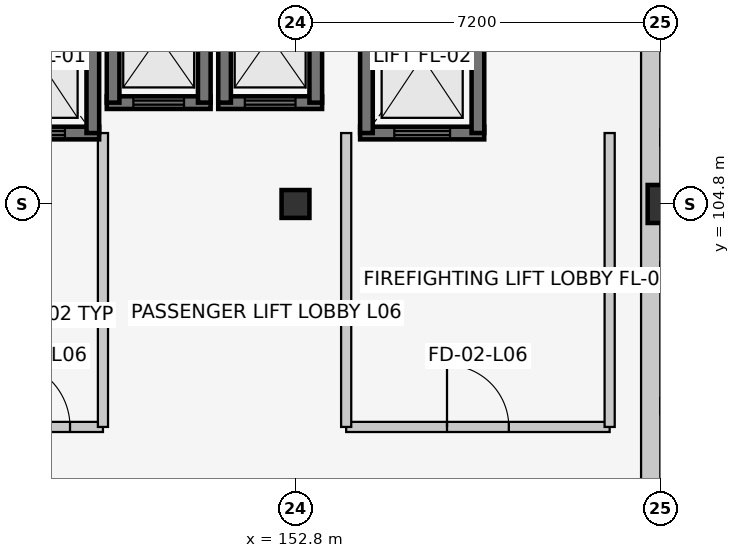
"""IFC4 building model, lengths in metres.
Left out: names, types, materials, properties, quantities, classifications, styles, units other than length and angle.
Written with IfcOpenShell. Run it as: python <this file> out.ifc"""

import sys

from ifc_helpers import new_model, si_unit, direction, frame, frame_2d, origin, origin_2d, place, context, subcontext, project, spatial, rectangle, extrude, element, fill, save


model = new_model("IFC4")
c1 = context("Model", 3, precision=1e-05, world=origin(), true_north=direction((0.0, 1.0)))
c2 = subcontext(c1, "Body", "Model", "MODEL_VIEW")
j1 = project(units=[si_unit("LENGTHUNIT", "METRE"), si_unit("PLANEANGLEUNIT", "RADIAN")], contexts=[c1])
p1 = place(None, origin())
s1 = spatial("IfcSite", under=j1, at=p1, CompositionType="ELEMENT")
p2 = place(p1, origin())
s2 = spatial("IfcBuilding", under=s1, at=p2, CompositionType="ELEMENT")
p3 = place(p2, frame((0.0, 0.0, 25.8)))
s3 = spatial("IfcBuildingStorey", under=s2, at=p3, CompositionType="ELEMENT", Elevation=25.8)
p4 = place(p3, frame((152.8, 104.8, 0.0), z_axis=(0.0, 0.0, 1.0), x_axis=(1.0, 0.0, 0.0)))
e1 = element("IfcColumn", 1, at=p4, inside=s3, PredefinedType="COLUMN", context=c2, shape_type="SweptSolid", body=[
    extrude(rectangle(XDim=0.55, YDim=0.55, at=origin_2d()), origin(), (0.0, 0.0, 1.0), 3.9),
])
p5 = place(p3, frame((160.0, 104.8, 0.0), z_axis=(0.0, 0.0, 1.0), x_axis=(1.0, 0.0, 0.0)))
e2 = element("IfcColumn", 2, at=p5, inside=s3, PredefinedType="COLUMN", context=c2, shape_type="SweptSolid", body=[
    extrude(rectangle(XDim=0.5, YDim=0.75, at=origin_2d()), origin(), (0.0, 0.0, 1.0), 3.9),
])
p6 = place(p3, frame((159.81, 112.0, 0.0), z_axis=(0.0, 0.0, 1.0), x_axis=(0.0, -1.0, 0.0)))
e3 = element("IfcWall", 3, at=p6, inside=s3, PredefinedType="SOLIDWALL", context=c2, shape_type="SweptSolid", body=[
    extrude(rectangle(XDim=28.8, YDim=0.38, at=frame_2d((14.4, 0.0))), origin(), (0.0, 0.0, 1.0), 3.045),
])
p7 = place(p3, frame((146.475, 106.2, 0.0), z_axis=(0.0, 0.0, 1.0), x_axis=(1.0, 0.0, 0.0)))
e4 = element("IfcWall", 4, at=p7, inside=s3, PredefinedType="SHEAR", context=c2, shape_type="SweptSolid", body=[
    extrude(rectangle(XDim=2.45, YDim=0.25, at=frame_2d((1.225, 0.0))), origin(), (0.0, 0.0, 1.0), 3.65),
])
p8 = place(p7, frame((0.675, 0.0, 0.0)))
e5 = element("IfcOpeningElement", 5, at=p8, cuts=e4, PredefinedType="OPENING", context=c2, shape_type="SweptSolid", body=[
    extrude(rectangle(XDim=1.1, YDim=2.15, at=frame_2d((0.55, 1.075))), frame((0.0, 0.137, 0.0), z_axis=(0.0, -1.0, 0.0), x_axis=(1.0, 0.0, 0.0)), (0.0, 0.0, 1.0), 0.274),
])
p9 = place(p3, frame((148.8, 106.2, 0.0), z_axis=(0.0, 0.0, 1.0), x_axis=(0.0, 1.0, 0.0)))
e6 = element("IfcWall", 6, at=p9, inside=s3, PredefinedType="SHEAR", context=c2, shape_type="SweptSolid", body=[
    extrude(rectangle(XDim=3.0, YDim=0.25, at=frame_2d((1.5, 0.0))), origin(), (0.0, 0.0, 1.0), 3.65),
])
p10 = place(p3, frame((146.4, 100.4, 0.0), z_axis=(0.0, 0.0, 1.0), x_axis=(1.0, 0.0, 0.0)))
e7 = element("IfcWall", 7, at=p10, inside=s3, PredefinedType="PARTITIONING", context=c2, shape_type="SweptSolid", body=[
    extrude(rectangle(XDim=2.6, YDim=0.2, at=frame_2d((1.3, 0.0))), origin(), (0.0, 0.0, 1.0), 3.65),
])
p11 = place(p10, frame((0.65, 0.0, 0.0)))
e8 = element("IfcOpeningElement", 8, at=p11, cuts=e7, PredefinedType="OPENING", context=c2, shape_type="SweptSolid", body=[
    extrude(rectangle(XDim=1.3, YDim=2.2, at=frame_2d((0.65, 1.1))), frame((0.0, 0.112, 0.0), z_axis=(0.0, -1.0, 0.0), x_axis=(1.0, 0.0, 0.0)), (0.0, 0.0, 1.0), 0.224),
])
p12 = place(p3, frame((149.0, 100.4, 0.0), z_axis=(0.0, 0.0, 1.0), x_axis=(0.0, 1.0, 0.0)))
e9 = element("IfcWall", 9, at=p12, inside=s3, PredefinedType="PARTITIONING", context=c2, shape_type="SweptSolid", body=[
    extrude(rectangle(XDim=5.8, YDim=0.2, at=frame_2d((2.9, 0.0))), origin(), (0.0, 0.0, 1.0), 3.395),
])
p13 = place(p3, frame((154.075, 106.2, 0.0), z_axis=(0.0, 0.0, 1.0), x_axis=(1.0, 0.0, 0.0)))
e10 = element("IfcWall", 10, at=p13, inside=s3, PredefinedType="SHEAR", context=c2, shape_type="SweptSolid", body=[
    extrude(rectangle(XDim=2.45, YDim=0.25, at=frame_2d((1.225, 0.0))), origin(), (0.0, 0.0, 1.0), 3.65),
])
p14 = place(p13, frame((0.675, 0.0, 0.0)))
e11 = element("IfcOpeningElement", 11, at=p14, cuts=e10, PredefinedType="OPENING", context=c2, shape_type="SweptSolid", body=[
    extrude(rectangle(XDim=1.1, YDim=2.15, at=frame_2d((0.55, 1.075))), frame((0.0, 0.137, 0.0), z_axis=(0.0, -1.0, 0.0), x_axis=(1.0, 0.0, 0.0)), (0.0, 0.0, 1.0), 0.274),
])
for number, where, z_axis, x_axis in (
    (12, (154.2, 109.2, 0.0), (0.0, 0.0, 1.0), (0.0, -1.0, 0.0)),
    (13, (156.4, 106.2, 0.0), (0.0, 0.0, 1.0), (0.0, 1.0, 0.0)),
):
    element("IfcWall", number, at=place(p3, frame(where, z_axis=z_axis, x_axis=x_axis)), inside=s3, PredefinedType="SHEAR", context=c2, shape_type="SweptSolid", body=[
        extrude(rectangle(XDim=3.0, YDim=0.25, at=frame_2d((1.5, 0.0))), origin(), (0.0, 0.0, 1.0), 3.65),
    ])
p15 = place(p3, frame((153.8, 100.4, 0.0), z_axis=(0.0, 0.0, 1.0), x_axis=(1.0, 0.0, 0.0)))
e14 = element("IfcWall", 14, at=p15, inside=s3, PredefinedType="PARTITIONING", context=c2, shape_type="SweptSolid", body=[
    extrude(rectangle(XDim=5.2, YDim=0.2, at=frame_2d((2.6, 0.0))), origin(), (0.0, 0.0, 1.0), 3.65),
])
p16 = place(p15, frame((1.99, 0.0, 0.0)))
e15 = element("IfcOpeningElement", 15, at=p16, cuts=e14, PredefinedType="OPENING", context=c2, shape_type="SweptSolid", body=[
    extrude(rectangle(XDim=1.22, YDim=2.2, at=frame_2d((0.61, 1.1))), frame((0.0, 0.112, 0.0), z_axis=(0.0, -1.0, 0.0), x_axis=(1.0, 0.0, 0.0)), (0.0, 0.0, 1.0), 0.224),
])
for number, where, z_axis, x_axis in (
    (16, (153.8, 106.2, 0.0), (0.0, 0.0, 1.0), (0.0, -1.0, 0.0)),
    (17, (159.0, 100.4, 0.0), (0.0, 0.0, 1.0), (0.0, 1.0, 0.0)),
):
    element("IfcWall", number, at=place(p3, frame(where, z_axis=z_axis, x_axis=x_axis)), inside=s3, PredefinedType="PARTITIONING", context=c2, shape_type="SweptSolid", body=[
        extrude(rectangle(XDim=5.8, YDim=0.2, at=frame_2d((2.9, 0.0))), origin(), (0.0, 0.0, 1.0), 3.65),
    ])
p17 = place(p3, frame((149.075, 106.8, 0.0), z_axis=(0.0, 0.0, 1.0), x_axis=(1.0, 0.0, 0.0)))
e18 = element("IfcWall", 18, at=p17, inside=s3, PredefinedType="SHEAR", context=c2, shape_type="SweptSolid", body=[
    extrude(rectangle(XDim=2.05, YDim=0.25, at=frame_2d((1.025, 0.0))), origin(), (0.0, 0.0, 1.0), 3.65),
])
p18 = place(p17, frame((0.525, 0.0, 0.0)))
e19 = element("IfcOpeningElement", 19, at=p18, cuts=e18, PredefinedType="OPENING", context=c2, shape_type="SweptSolid", body=[
    extrude(rectangle(XDim=1.0, YDim=2.15, at=frame_2d((0.5, 1.075))), frame((0.0, 0.137, 0.0), z_axis=(0.0, -1.0, 0.0), x_axis=(1.0, 0.0, 0.0)), (0.0, 0.0, 1.0), 0.274),
])
for number, where, z_axis, x_axis in (
    (20, (149.2, 109.4, 0.0), (0.0, 0.0, 1.0), (0.0, -1.0, 0.0)),
    (21, (151.0, 106.8, 0.0), (0.0, 0.0, 1.0), (0.0, 1.0, 0.0)),
):
    element("IfcWall", number, at=place(p3, frame(where, z_axis=z_axis, x_axis=x_axis)), inside=s3, PredefinedType="SHEAR", context=c2, shape_type="SweptSolid", body=[
        extrude(rectangle(XDim=2.6, YDim=0.25, at=frame_2d((1.3, 0.0))), origin(), (0.0, 0.0, 1.0), 3.65),
    ])
p19 = place(p3, frame((151.275, 106.8, 0.0), z_axis=(0.0, 0.0, 1.0), x_axis=(1.0, 0.0, 0.0)))
e22 = element("IfcWall", 22, at=p19, inside=s3, PredefinedType="SHEAR", context=c2, shape_type="SweptSolid", body=[
    extrude(rectangle(XDim=2.05, YDim=0.25, at=frame_2d((1.025, 0.0))), origin(), (0.0, 0.0, 1.0), 3.65),
])
p20 = place(p19, frame((0.525, 0.0, 0.0)))
e23 = element("IfcOpeningElement", 23, at=p20, cuts=e22, PredefinedType="OPENING", context=c2, shape_type="SweptSolid", body=[
    extrude(rectangle(XDim=1.0, YDim=2.15, at=frame_2d((0.5, 1.075))), frame((0.0, 0.137, 0.0), z_axis=(0.0, -1.0, 0.0), x_axis=(1.0, 0.0, 0.0)), (0.0, 0.0, 1.0), 0.274),
])
for number, where, z_axis, x_axis in (
    (24, (151.4, 109.4, 0.0), (0.0, 0.0, 1.0), (0.0, -1.0, 0.0)),
    (25, (153.2, 106.8, 0.0), (0.0, 0.0, 1.0), (0.0, 1.0, 0.0)),
):
    element("IfcWall", number, at=place(p3, frame(where, z_axis=z_axis, x_axis=x_axis)), inside=s3, PredefinedType="SHEAR", context=c2, shape_type="SweptSolid", body=[
        extrude(rectangle(XDim=2.6, YDim=0.25, at=frame_2d((1.3, 0.0))), origin(), (0.0, 0.0, 1.0), 3.65),
    ])
p21 = place(p8, origin())
e26 = element("IfcDoor", 26, at=p21, inside=s3, OperationType="SLIDING_TO_LEFT", PredefinedType="DOOR", context=c2, shape_type="SweptSolid", body=[
    extrude(rectangle(XDim=1.1, YDim=2.15, at=frame_2d((0.55, 1.075))), frame((0.0, 0.025, 0.0), z_axis=(0.0, -1.0, 0.0), x_axis=(1.0, 0.0, 0.0)), (0.0, 0.0, 1.0), 0.05),
])
fill(e5, e26)
p22 = place(p11, origin())
e27 = element("IfcDoor", 27, at=p22, inside=s3, OperationType="SINGLE_SWING_LEFT", PredefinedType="DOOR", context=c2, shape_type="SweptSolid", body=[
    extrude(rectangle(XDim=1.3, YDim=2.2, at=frame_2d((0.65, 1.1))), frame((0.0, 0.025, 0.0), z_axis=(0.0, -1.0, 0.0), x_axis=(1.0, 0.0, 0.0)), (0.0, 0.0, 1.0), 0.05),
])
fill(e8, e27)
p23 = place(p14, origin())
e28 = element("IfcDoor", 28, at=p23, inside=s3, OperationType="SLIDING_TO_LEFT", PredefinedType="DOOR", context=c2, shape_type="SweptSolid", body=[
    extrude(rectangle(XDim=1.1, YDim=2.15, at=frame_2d((0.55, 1.075))), frame((0.0, 0.025, 0.0), z_axis=(0.0, -1.0, 0.0), x_axis=(1.0, 0.0, 0.0)), (0.0, 0.0, 1.0), 0.05),
])
fill(e11, e28)
p24 = place(p16, origin())
e29 = element("IfcDoor", 29, at=p24, inside=s3, OperationType="SINGLE_SWING_LEFT", PredefinedType="DOOR", context=c2, shape_type="SweptSolid", body=[
    extrude(rectangle(XDim=1.22, YDim=2.2, at=frame_2d((0.61, 1.1))), frame((0.0, 0.025, 0.0), z_axis=(0.0, -1.0, 0.0), x_axis=(1.0, 0.0, 0.0)), (0.0, 0.0, 1.0), 0.05),
])
fill(e15, e29)
p25 = place(p18, origin())
e30 = element("IfcDoor", 30, at=p25, inside=s3, OperationType="SLIDING_TO_LEFT", PredefinedType="DOOR", context=c2, shape_type="SweptSolid", body=[
    extrude(rectangle(XDim=1.0, YDim=2.15, at=frame_2d((0.5, 1.075))), frame((0.0, 0.025, 0.0), z_axis=(0.0, -1.0, 0.0), x_axis=(1.0, 0.0, 0.0)), (0.0, 0.0, 1.0), 0.05),
])
fill(e19, e30)
p26 = place(p20, origin())
e31 = element("IfcDoor", 31, at=p26, inside=s3, OperationType="SLIDING_TO_LEFT", PredefinedType="DOOR", context=c2, shape_type="SweptSolid", body=[
    extrude(rectangle(XDim=1.0, YDim=2.15, at=frame_2d((0.5, 1.075))), frame((0.0, 0.025, 0.0), z_axis=(0.0, -1.0, 0.0), x_axis=(1.0, 0.0, 0.0)), (0.0, 0.0, 1.0), 0.05),
])
fill(e23, e31)
save(model, sys.argv[1])
